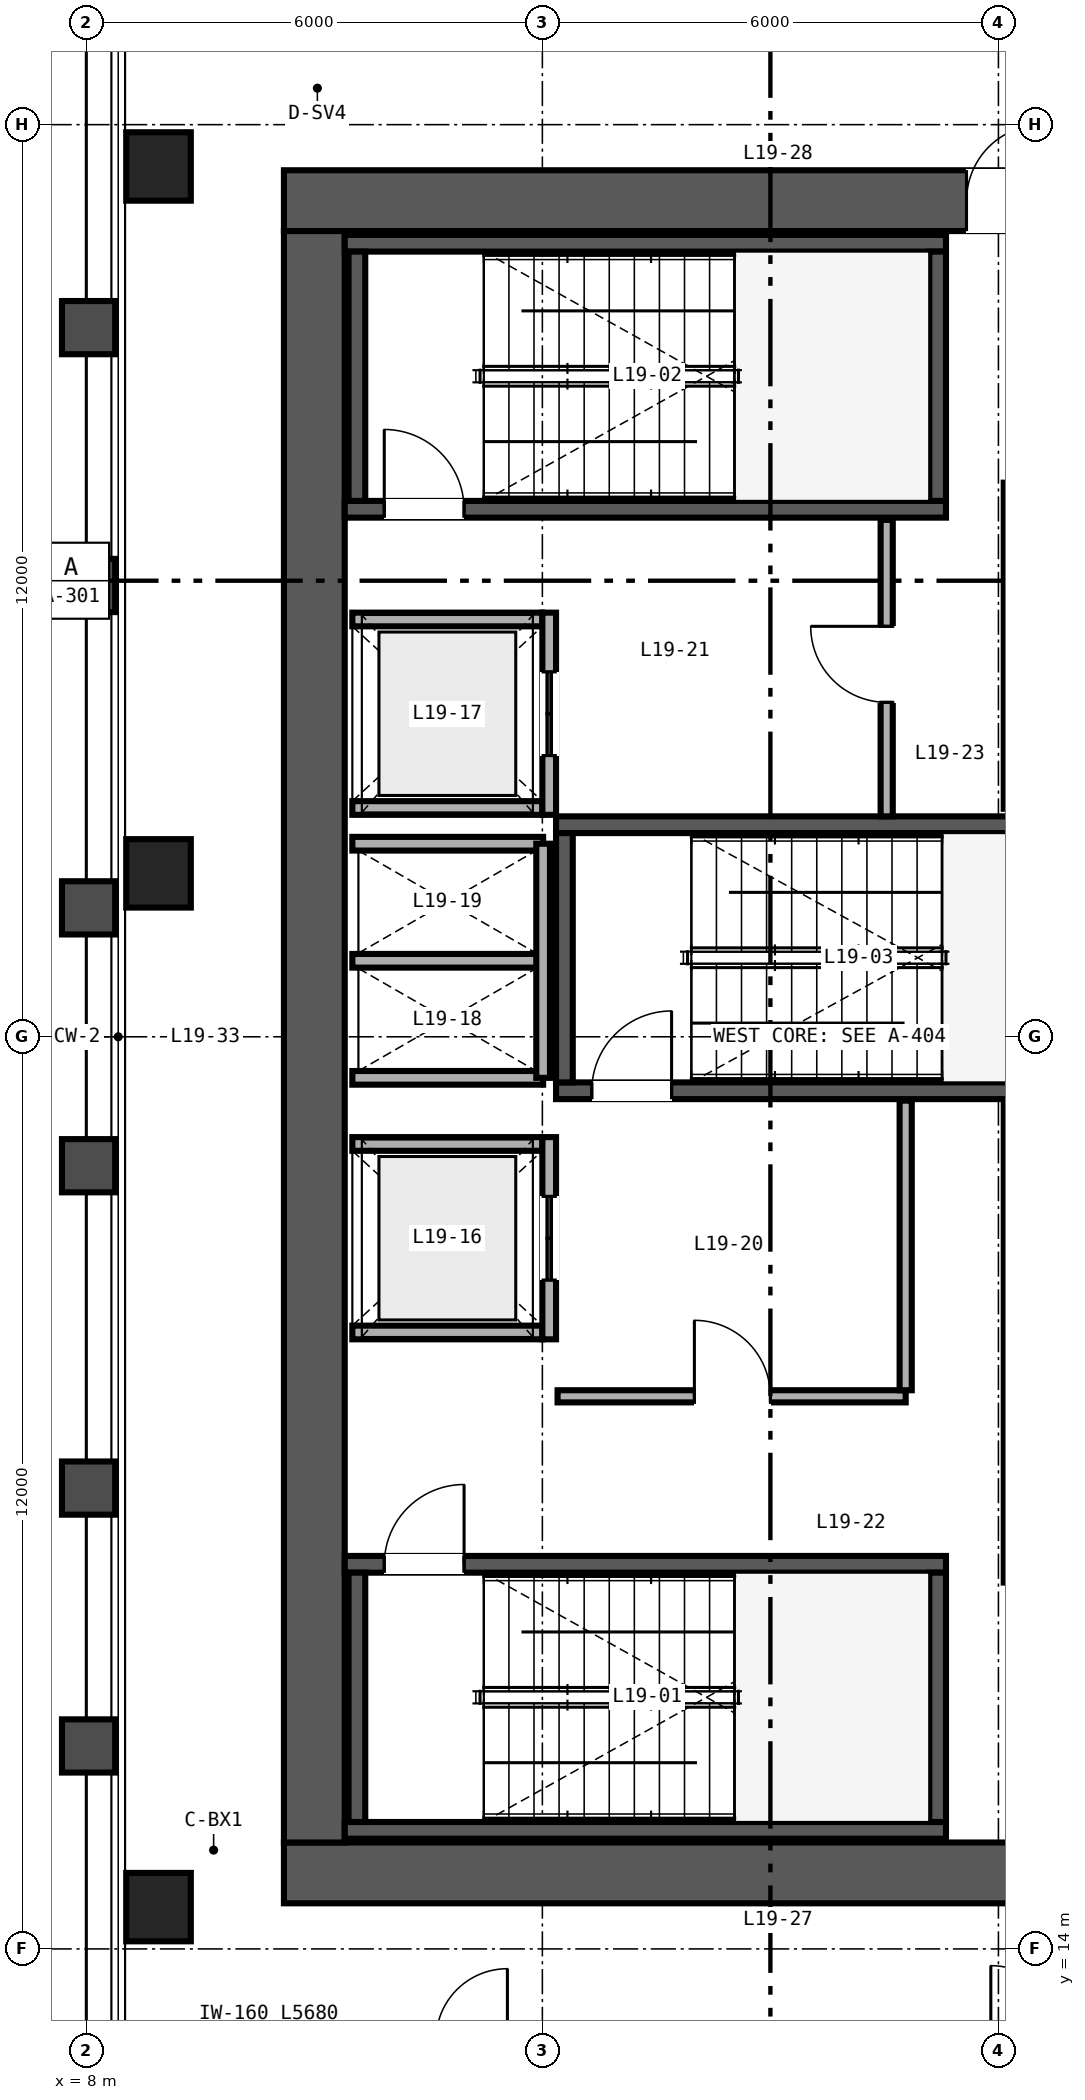
"""IFC4 building model, lengths in metres.
Left out: names, types, materials, properties, quantities, classifications, styles, units other than length and angle.
Written with IfcOpenShell. Run it as: python <this file> out.ifc"""

import sys

from ifc_helpers import new_model, si_unit, direction, frame, frame_2d, origin, origin_2d, place, context, subcontext, project, spatial, rectangle, hollow_rectangle, extrude, source, transform, mapped, element, fill, save


model = new_model("IFC4")
c1 = context("Model", 3, precision=1e-05, world=origin(), true_north=direction((0.0, 1.0)))
c2 = subcontext(c1, "Body", "Model", "MODEL_VIEW")
j1 = project(units=[si_unit("LENGTHUNIT", "METRE"), si_unit("PLANEANGLEUNIT", "RADIAN")], contexts=[c1])
p1 = place(None, origin())
s1 = spatial("IfcSite", under=j1, at=p1, CompositionType="ELEMENT")
p2 = place(p1, origin())
s2 = spatial("IfcBuilding", under=s1, at=p2, CompositionType="ELEMENT")
p3 = place(p2, frame((0.0, 0.0, 78.0)))
s3 = spatial("IfcBuildingStorey", under=s2, at=p3, CompositionType="ELEMENT", Elevation=78.0)
p4 = place(p3, frame((10.6, 15.0, 0.0), z_axis=(0.0, 0.0, 1.0), x_axis=(1.0, 0.0, 0.0)))
e1 = element("IfcWall", 1, at=p4, inside=s3, PredefinedType="SHEAR", context=c2, shape_type="SweptSolid", body=[
    extrude(rectangle(XDim=12.8, YDim=0.8, at=frame_2d((6.4, 0.0))), origin(), (0.0, 0.0, 1.0), 3.35),
])
p5 = place(p4, frame((10.3, 0.0, 0.0)))
e2 = element("IfcOpeningElement", 2, at=p5, cuts=e1, PredefinedType="OPENING", context=c2, shape_type="SweptSolid", body=[
    extrude(rectangle(XDim=1.0, YDim=2.15, at=frame_2d((0.5, 1.075))), frame((0.0, 0.41, 0.0), z_axis=(0.0, -1.0, 0.0), x_axis=(1.0, 0.0, 0.0)), (0.0, 0.0, 1.0), 0.82),
])
p6 = place(p3, frame((10.6, 37.0, 0.0), z_axis=(0.0, 0.0, 1.0), x_axis=(1.0, 0.0, 0.0)))
e3 = element("IfcWall", 3, at=p6, inside=s3, PredefinedType="SHEAR", context=c2, shape_type="SweptSolid", body=[
    extrude(rectangle(XDim=12.8, YDim=0.8, at=frame_2d((6.4, 0.0))), origin(), (0.0, 0.0, 1.0), 3.35),
])
p7 = place(p6, frame((8.98, 0.0, 0.0)))
e4 = element("IfcOpeningElement", 4, at=p7, cuts=e3, PredefinedType="OPENING", context=c2, shape_type="SweptSolid", body=[
    extrude(rectangle(XDim=1.0, YDim=2.15, at=frame_2d((0.5, 1.075))), frame((0.0, 0.41, 0.0), z_axis=(0.0, -1.0, 0.0), x_axis=(1.0, 0.0, 0.0)), (0.0, 0.0, 1.0), 0.82),
])
p8 = place(p3, frame((11.0, 15.4, 0.0), z_axis=(0.0, 0.0, 1.0), x_axis=(0.0, 1.0, 0.0)))
e5 = element("IfcWall", 5, at=p8, inside=s3, PredefinedType="SHEAR", context=c2, shape_type="SweptSolid", body=[
    extrude(rectangle(XDim=21.2, YDim=0.8, at=frame_2d((10.6, 0.0))), origin(), (0.0, 0.0, 1.0), 3.35),
])
p9 = place(p3, frame((11.4, 15.56, 0.0), z_axis=(0.0, 0.0, 1.0), x_axis=(1.0, 0.0, 0.0)))
e6 = element("IfcWall", 6, at=p9, inside=s3, PredefinedType="SHEAR", context=c2, shape_type="SweptSolid", body=[
    extrude(rectangle(XDim=7.91, YDim=0.22, at=frame_2d((3.955, 0.0))), origin(), (0.0, 0.0, 1.0), 3.4),
])
p10 = place(p3, frame((11.4, 19.06, 0.0), z_axis=(0.0, 0.0, 1.0), x_axis=(1.0, 0.0, 0.0)))
e7 = element("IfcWall", 7, at=p10, inside=s3, PredefinedType="SHEAR", context=c2, shape_type="SweptSolid", body=[
    extrude(rectangle(XDim=7.91, YDim=0.22, at=frame_2d((3.955, 0.0))), origin(), (0.0, 0.0, 1.0), 3.4),
])
p11 = place(p10, frame((0.52, 0.0, 0.0)))
e8 = element("IfcOpeningElement", 8, at=p11, cuts=e7, PredefinedType="OPENING", context=c2, shape_type="SweptSolid", body=[
    extrude(rectangle(XDim=1.05, YDim=2.15, at=frame_2d((0.525, 1.075))), frame((0.0, 0.12, 0.0), z_axis=(0.0, -1.0, 0.0), x_axis=(1.0, 0.0, 0.0)), (0.0, 0.0, 1.0), 0.24),
])
for number, where, z_axis, x_axis in (
    (9, (11.56, 15.67, 0.0), (0.0, 0.0, 1.0), (0.0, 1.0, 0.0)),
    (10, (19.2, 15.67, 0.0), (0.0, 0.0, 1.0), (0.0, 1.0, 0.0)),
):
    element("IfcWall", number, at=place(p3, frame(where, z_axis=z_axis, x_axis=x_axis)), inside=s3, PredefinedType="SHEAR", context=c2, shape_type="SweptSolid", body=[
        extrude(rectangle(XDim=3.28, YDim=0.22, at=frame_2d((1.64, 0.0))), origin(), (0.0, 0.0, 1.0), 3.4),
    ])
p12 = place(p3, frame((11.4, 32.94, 0.0), z_axis=(0.0, 0.0, 1.0), x_axis=(1.0, 0.0, 0.0)))
e11 = element("IfcWall", 11, at=p12, inside=s3, PredefinedType="SHEAR", context=c2, shape_type="SweptSolid", body=[
    extrude(rectangle(XDim=7.91, YDim=0.22, at=frame_2d((3.955, 0.0))), origin(), (0.0, 0.0, 1.0), 3.4),
])
p13 = place(p12, frame((0.52, 0.0, 0.0)))
e12 = element("IfcOpeningElement", 12, at=p13, cuts=e11, PredefinedType="OPENING", context=c2, shape_type="SweptSolid", body=[
    extrude(rectangle(XDim=1.05, YDim=2.15, at=frame_2d((0.525, 1.075))), frame((0.0, 0.12, 0.0), z_axis=(0.0, -1.0, 0.0), x_axis=(1.0, 0.0, 0.0)), (0.0, 0.0, 1.0), 0.24),
])
p14 = place(p3, frame((11.4, 36.44, 0.0), z_axis=(0.0, 0.0, 1.0), x_axis=(1.0, 0.0, 0.0)))
e13 = element("IfcWall", 13, at=p14, inside=s3, PredefinedType="SHEAR", context=c2, shape_type="SweptSolid", body=[
    extrude(rectangle(XDim=7.91, YDim=0.22, at=frame_2d((3.955, 0.0))), origin(), (0.0, 0.0, 1.0), 3.4),
])
for number, where, z_axis, x_axis in (
    (14, (11.56, 33.05, 0.0), (0.0, 0.0, 1.0), (0.0, 1.0, 0.0)),
    (15, (19.2, 33.05, 0.0), (0.0, 0.0, 1.0), (0.0, 1.0, 0.0)),
):
    element("IfcWall", number, at=place(p3, frame(where, z_axis=z_axis, x_axis=x_axis)), inside=s3, PredefinedType="SHEAR", context=c2, shape_type="SweptSolid", body=[
        extrude(rectangle(XDim=3.28, YDim=0.22, at=frame_2d((1.64, 0.0))), origin(), (0.0, 0.0, 1.0), 3.4),
    ])
p15 = place(p3, frame((14.18, 25.29, 0.0), z_axis=(0.0, 0.0, 1.0), x_axis=(1.0, 0.0, 0.0)))
e16 = element("IfcWall", 16, at=p15, inside=s3, PredefinedType="SHEAR", context=c2, shape_type="SweptSolid", body=[
    extrude(rectangle(XDim=8.42, YDim=0.22, at=frame_2d((4.21, 0.0))), origin(), (0.0, 0.0, 1.0), 3.4),
])
p16 = place(p15, frame((0.47, 0.0, 0.0)))
e17 = element("IfcOpeningElement", 17, at=p16, cuts=e16, PredefinedType="OPENING", context=c2, shape_type="SweptSolid", body=[
    extrude(rectangle(XDim=1.05, YDim=2.15, at=frame_2d((0.525, 1.075))), frame((0.0, 0.12, 0.0), z_axis=(0.0, -1.0, 0.0), x_axis=(1.0, 0.0, 0.0)), (0.0, 0.0, 1.0), 0.24),
])
p17 = place(p3, frame((14.18, 28.79, 0.0), z_axis=(0.0, 0.0, 1.0), x_axis=(1.0, 0.0, 0.0)))
e18 = element("IfcWall", 18, at=p17, inside=s3, PredefinedType="SHEAR", context=c2, shape_type="SweptSolid", body=[
    extrude(rectangle(XDim=8.42, YDim=0.22, at=frame_2d((4.21, 0.0))), origin(), (0.0, 0.0, 1.0), 3.4),
])
p18 = place(p3, frame((14.29, 25.4, 0.0), z_axis=(0.0, 0.0, 1.0), x_axis=(0.0, 1.0, 0.0)))
e19 = element("IfcWall", 19, at=p18, inside=s3, PredefinedType="SHEAR", context=c2, shape_type="SweptSolid", body=[
    extrude(rectangle(XDim=3.28, YDim=0.22, at=frame_2d((1.64, 0.0))), origin(), (0.0, 0.0, 1.0), 3.4),
])
m1 = source(origin(), c2, "Body", "SweptSolid", [
    extrude(hollow_rectangle(XDim=0.85, YDim=0.9, WallThickness=0.04, at=origin_2d()), origin(), (0.0, 0.0, 1.0), 3.35),
])
for number, where, z_axis, x_axis in (
    (20, (8.95, 14.55, 0.0), (0.0, 0.0, 1.0), (1.0, 0.0, 0.0)),
    (21, (8.95, 28.15, 0.0), (0.0, 0.0, 1.0), (1.0, 0.0, 0.0)),
    (22, (8.95, 37.45, 0.0), (0.0, 0.0, 1.0), (1.0, 0.0, 0.0)),
):
    element("IfcColumn", number, at=place(p3, frame(where, z_axis=z_axis, x_axis=x_axis)), inside=s3, PredefinedType="COLUMN", context=c2, shape_type="MappedRepresentation", body=[
        mapped(m1, transform((0.0, 0.0, 0.0), scale=1.0)),
    ])
p19 = place(p3, frame((20.16, 18.82, 0.0), z_axis=(0.0, 0.0, 1.0), x_axis=(0.0, 1.0, 0.0)))
e23 = element("IfcWall", 23, at=p19, inside=s3, PredefinedType="SOLIDWALL", context=c2, shape_type="SweptSolid", body=[
    extrude(rectangle(XDim=6.32, YDim=0.18, at=frame_2d((3.16, 0.0))), origin(), (0.0, 0.0, 1.0), 2.36),
])
p20 = place(p3, frame((20.16, 29.0, 0.0), z_axis=(0.0, 0.0, 1.0), x_axis=(0.0, 1.0, 0.0)))
e24 = element("IfcWall", 24, at=p20, inside=s3, PredefinedType="SOLIDWALL", context=c2, shape_type="SweptSolid", body=[
    extrude(rectangle(XDim=4.29, YDim=0.18, at=frame_2d((2.145, 0.0))), origin(), (0.0, 0.0, 1.0), 3.35),
])
for number, where, z_axis, x_axis in (
    (25, (11.5, 22.11, 0.0), (0.0, 0.0, 1.0), (1.0, 0.0, 0.0)),
    (26, (11.5, 24.59, 0.0), (0.0, 0.0, 1.0), (1.0, 0.0, 0.0)),
):
    element("IfcWall", number, at=place(p3, frame(where, z_axis=z_axis, x_axis=x_axis)), inside=s3, PredefinedType="SOLIDWALL", context=c2, shape_type="SweptSolid", body=[
        extrude(rectangle(XDim=2.5, YDim=0.18, at=frame_2d((1.25, 0.0))), origin(), (0.0, 0.0, 1.0), 3.35),
    ])
p21 = place(p3, frame((14.09, 22.02, 0.0), z_axis=(0.0, 0.0, 1.0), x_axis=(0.0, 1.0, 0.0)))
e27 = element("IfcWall", 27, at=p21, inside=s3, PredefinedType="SOLIDWALL", context=c2, shape_type="SweptSolid", body=[
    extrude(rectangle(XDim=2.66, YDim=0.18, at=frame_2d((1.33, 0.0))), origin(), (0.0, 0.0, 1.0), 3.35),
])
p22 = place(p21, frame((0.78, 0.0, 0.0)))
e28 = element("IfcOpeningElement", 28, at=p22, cuts=e27, PredefinedType="OPENING", context=c2, shape_type="SweptSolid", body=[
    extrude(rectangle(XDim=1.1, YDim=2.2, at=frame_2d((0.55, 1.1))), frame((0.0, 0.1, 0.0), z_axis=(0.0, -1.0, 0.0), x_axis=(1.0, 0.0, 0.0)), (0.0, 0.0, 1.0), 0.2),
])
for number, where, z_axis, x_axis in (
    (29, (11.5, 29.01, 0.0), (0.0, 0.0, 1.0), (1.0, 0.0, 0.0)),
    (30, (11.5, 31.49, 0.0), (0.0, 0.0, 1.0), (1.0, 0.0, 0.0)),
):
    element("IfcWall", number, at=place(p3, frame(where, z_axis=z_axis, x_axis=x_axis)), inside=s3, PredefinedType="SOLIDWALL", context=c2, shape_type="SweptSolid", body=[
        extrude(rectangle(XDim=2.5, YDim=0.18, at=frame_2d((1.25, 0.0))), origin(), (0.0, 0.0, 1.0), 3.35),
    ])
p23 = place(p3, frame((14.09, 28.92, 0.0), z_axis=(0.0, 0.0, 1.0), x_axis=(0.0, 1.0, 0.0)))
e31 = element("IfcWall", 31, at=p23, inside=s3, PredefinedType="SOLIDWALL", context=c2, shape_type="SweptSolid", body=[
    extrude(rectangle(XDim=2.66, YDim=0.18, at=frame_2d((1.33, 0.0))), origin(), (0.0, 0.0, 1.0), 3.35),
])
p24 = place(p23, frame((0.78, 0.0, 0.0)))
e32 = element("IfcOpeningElement", 32, at=p24, cuts=e31, PredefinedType="OPENING", context=c2, shape_type="SweptSolid", body=[
    extrude(rectangle(XDim=1.1, YDim=2.2, at=frame_2d((0.55, 1.1))), frame((0.0, 0.1, 0.0), z_axis=(0.0, -1.0, 0.0), x_axis=(1.0, 0.0, 0.0)), (0.0, 0.0, 1.0), 0.2),
])
for number, where, z_axis, x_axis in (
    (33, (11.5, 25.46, 0.0), (0.0, 0.0, 1.0), (1.0, 0.0, 0.0)),
    (34, (11.5, 27.0, 0.0), (0.0, 0.0, 1.0), (1.0, 0.0, 0.0)),
    (35, (11.5, 28.54, 0.0), (0.0, 0.0, 1.0), (1.0, 0.0, 0.0)),
):
    element("IfcWall", number, at=place(p3, frame(where, z_axis=z_axis, x_axis=x_axis)), inside=s3, PredefinedType="SOLIDWALL", context=c2, shape_type="SweptSolid", body=[
        extrude(rectangle(XDim=2.51, YDim=0.18, at=frame_2d((1.255, 0.0))), origin(), (0.0, 0.0, 1.0), 3.35),
    ])
p25 = place(p3, frame((14.01, 25.46, 0.0), z_axis=(0.0, 0.0, 1.0), x_axis=(0.0, 1.0, 0.0)))
e36 = element("IfcWall", 36, at=p25, inside=s3, PredefinedType="SOLIDWALL", context=c2, shape_type="SweptSolid", body=[
    extrude(rectangle(XDim=3.08, YDim=0.18, at=frame_2d((1.54, 0.0))), origin(), (0.0, 0.0, 1.0), 3.35),
])
p26 = place(p3, frame((14.2, 21.27, 0.0), z_axis=(0.0, 0.0, 1.0), x_axis=(1.0, 0.0, 0.0)))
e37 = element("IfcWall", 37, at=p26, inside=s3, PredefinedType="PARTITIONING", context=c2, shape_type="SweptSolid", body=[
    extrude(rectangle(XDim=4.58, YDim=0.16, at=frame_2d((2.29, 0.0))), origin(), (0.0, 0.0, 1.0), 3.35),
])
p27 = place(p26, frame((1.8, 0.0, 0.0)))
e38 = element("IfcOpeningElement", 38, at=p27, cuts=e37, PredefinedType="OPENING", context=c2, shape_type="SweptSolid", body=[
    extrude(rectangle(XDim=1.0, YDim=2.15, at=frame_2d((0.5, 1.075))), frame((0.0, 0.09, 0.0), z_axis=(0.0, -1.0, 0.0), x_axis=(1.0, 0.0, 0.0)), (0.0, 0.0, 1.0), 0.18),
])
p28 = place(p3, frame((18.78, 21.35, 0.0), z_axis=(0.0, 0.0, 1.0), x_axis=(0.0, 1.0, 0.0)))
e39 = element("IfcWall", 39, at=p28, inside=s3, PredefinedType="PARTITIONING", context=c2, shape_type="SweptSolid", body=[
    extrude(rectangle(XDim=3.81, YDim=0.16, at=frame_2d((1.905, 0.0))), origin(), (0.0, 0.0, 1.0), 3.35),
])
p29 = place(p3, frame((18.53, 28.9, 0.0), z_axis=(0.0, 0.0, 1.0), x_axis=(0.0, 1.0, 0.0)))
e40 = element("IfcWall", 40, at=p29, inside=s3, PredefinedType="PARTITIONING", context=c2, shape_type="SweptSolid", body=[
    extrude(rectangle(XDim=3.9, YDim=0.16, at=frame_2d((1.95, 0.0))), origin(), (0.0, 0.0, 1.0), 3.35),
])
p30 = place(p29, frame((1.5, 0.0, 0.0)))
e41 = element("IfcOpeningElement", 41, at=p30, cuts=e40, PredefinedType="OPENING", context=c2, shape_type="SweptSolid", body=[
    extrude(rectangle(XDim=1.0, YDim=2.15, at=frame_2d((0.5, 1.075))), frame((0.0, 0.09, 0.0), z_axis=(0.0, -1.0, 0.0), x_axis=(1.0, 0.0, 0.0)), (0.0, 0.0, 1.0), 0.18),
])
m2 = source(origin(), c2, "Body", "SweptSolid", [
    extrude(rectangle(XDim=1.05, YDim=2.15, at=frame_2d((0.525, 1.075))), frame((0.0, 0.025, 0.0), z_axis=(0.0, -1.0, 0.0), x_axis=(1.0, 0.0, 0.0)), (0.0, 0.0, 1.0), 0.05),
])
p31 = place(p11, origin())
e42 = element("IfcDoor", 42, at=p31, inside=s3, OperationType="SINGLE_SWING_RIGHT", PredefinedType="DOOR", context=c2, shape_type="MappedRepresentation", body=[
    mapped(m2, transform((0.0, 0.0, 0.0), scale=1.0)),
])
fill(e8, e42)
p32 = place(p13, origin())
e43 = element("IfcDoor", 43, at=p32, inside=s3, OperationType="SINGLE_SWING_LEFT", PredefinedType="DOOR", context=c2, shape_type="MappedRepresentation", body=[
    mapped(m2, transform((0.0, 0.0, 0.0), scale=1.0)),
])
fill(e12, e43)
p33 = place(p16, origin())
e44 = element("IfcDoor", 44, at=p33, inside=s3, OperationType="SINGLE_SWING_RIGHT", PredefinedType="DOOR", context=c2, shape_type="MappedRepresentation", body=[
    mapped(m2, transform((0.0, 0.0, 0.0), scale=1.0)),
])
fill(e17, e44)
m3 = source(origin(), c2, "Body", "SweptSolid", [
    extrude(rectangle(XDim=1.1, YDim=2.2, at=frame_2d((0.55, 1.1))), frame((0.0, 0.025, 0.0), z_axis=(0.0, -1.0, 0.0), x_axis=(1.0, 0.0, 0.0)), (0.0, 0.0, 1.0), 0.05),
])
p34 = place(p22, origin())
e45 = element("IfcDoor", 45, at=p34, inside=s3, OperationType="DOUBLE_DOOR_SLIDING", PredefinedType="DOOR", context=c2, shape_type="MappedRepresentation", body=[
    mapped(m3, transform((0.0, 0.0, 0.0), scale=1.0)),
])
fill(e28, e45)
p35 = place(p24, origin())
e46 = element("IfcDoor", 46, at=p35, inside=s3, OperationType="DOUBLE_DOOR_SLIDING", PredefinedType="DOOR", context=c2, shape_type="MappedRepresentation", body=[
    mapped(m3, transform((0.0, 0.0, 0.0), scale=1.0)),
])
fill(e32, e46)
m4 = source(origin(), c2, "Body", "SweptSolid", [
    extrude(rectangle(XDim=1.0, YDim=2.15, at=frame_2d((0.5, 1.075))), frame((0.0, 0.025, 0.0), z_axis=(0.0, -1.0, 0.0), x_axis=(1.0, 0.0, 0.0)), (0.0, 0.0, 1.0), 0.05),
])
p36 = place(p27, origin())
e47 = element("IfcDoor", 47, at=p36, inside=s3, OperationType="SINGLE_SWING_LEFT", PredefinedType="DOOR", context=c2, shape_type="MappedRepresentation", body=[
    mapped(m4, transform((0.0, 0.0, 0.0), scale=1.0)),
])
fill(e38, e47)
p37 = place(p30, origin())
e48 = element("IfcDoor", 48, at=p37, inside=s3, OperationType="SINGLE_SWING_RIGHT", PredefinedType="DOOR", context=c2, shape_type="MappedRepresentation", body=[
    mapped(m4, transform((0.0, 0.0, 0.0), scale=1.0)),
])
fill(e41, e48)
p38 = place(p7, origin())
e49 = element("IfcDoor", 49, at=p38, inside=s3, OperationType="SINGLE_SWING_RIGHT", PredefinedType="DOOR", context=c2, shape_type="MappedRepresentation", body=[
    mapped(m4, transform((0.0, 0.0, 0.0), scale=1.0)),
])
fill(e4, e49)
save(model, sys.argv[1])
